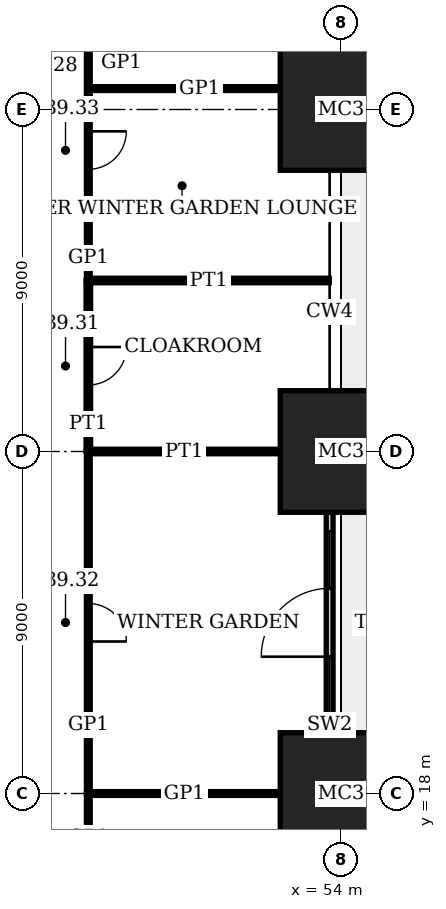
"""IFC4 building model, lengths in metres.
Left out: names, types, materials, properties, quantities, classifications, styles, units other than length and angle.
Written with IfcOpenShell. Run it as: python <this file> out.ifc"""

import sys

from ifc_helpers import new_model, si_unit, direction, frame, frame_2d, origin, origin_2d, place, context, subcontext, project, spatial, rectangle, extrude, element, fill, save


model = new_model("IFC4")
c1 = context("Model", 3, precision=1e-05, world=origin(), true_north=direction((0.0, 1.0)))
c2 = subcontext(c1, "Body", "Model", "MODEL_VIEW")
j1 = project(units=[si_unit("LENGTHUNIT", "METRE"), si_unit("PLANEANGLEUNIT", "RADIAN")], contexts=[c1])
p1 = place(None, origin())
s1 = spatial("IfcSite", under=j1, at=p1, CompositionType="ELEMENT")
p2 = place(p1, origin())
s2 = spatial("IfcBuilding", under=s1, at=p2, CompositionType="ELEMENT")
p3 = place(p2, frame((0.0, 0.0, 162.2)))
s3 = spatial("IfcBuildingStorey", under=s2, at=p3, CompositionType="ELEMENT", Elevation=162.2)
for number, where, z_axis, x_axis in (
    (1, (54.0, 18.0, 0.0), (0.0, 0.0, 1.0), (1.0, 0.0, 0.0)),
    (2, (54.0, 27.0, 0.0), (0.0, 0.0, 1.0), (1.0, 0.0, 0.0)),
    (3, (54.0, 36.0, 0.0), (0.0, 0.0, 1.0), (1.0, 0.0, 0.0)),
):
    element("IfcColumn", number, at=place(p3, frame(where, z_axis=z_axis, x_axis=x_axis)), inside=s3, PredefinedType="COLUMN", context=c2, shape_type="SweptSolid", body=[
        extrude(rectangle(XDim=3.2, YDim=3.2, at=origin_2d()), origin(), (0.0, 0.0, 1.0), 4.0),
    ])
p4 = place(p3, frame((53.7, 19.6, 0.0), z_axis=(0.0, 0.0, 1.0), x_axis=(0.0, 1.0, 0.0)))
e4 = element("IfcWall", 4, at=p4, inside=s3, PredefinedType="SOLIDWALL", context=c2, shape_type="SweptSolid", body=[
    extrude(rectangle(XDim=5.8, YDim=0.18, at=frame_2d((2.9, 0.0))), origin(), (0.0, 0.0, 1.0), 2.95),
])
p5 = place(p4, frame((2.0, 0.0, 0.0)))
e5 = element("IfcOpeningElement", 5, at=p5, cuts=e4, PredefinedType="OPENING", context=c2, shape_type="SweptSolid", body=[
    extrude(rectangle(XDim=1.8, YDim=2.7, at=frame_2d((0.9, 1.35))), frame((0.0, 0.1, 0.0), z_axis=(0.0, -1.0, 0.0), x_axis=(1.0, 0.0, 0.0)), (0.0, 0.0, 1.0), 0.2),
])
p6 = place(p4, frame((0.5, 0.0, 0.3)))
e6 = element("IfcOpeningElement", 6, at=p6, cuts=e4, PredefinedType="OPENING", context=c2, shape_type="SweptSolid", body=[
    extrude(rectangle(XDim=1.5, YDim=2.4, at=frame_2d((0.75, 1.2))), frame((0.0, 0.1, 0.0), z_axis=(0.0, -1.0, 0.0), x_axis=(1.0, 0.0, 0.0)), (0.0, 0.0, 1.0), 0.2),
])
p7 = place(p4, frame((3.8, 0.0, 0.3)))
e7 = element("IfcOpeningElement", 7, at=p7, cuts=e4, PredefinedType="OPENING", context=c2, shape_type="SweptSolid", body=[
    extrude(rectangle(XDim=1.5, YDim=2.4, at=frame_2d((0.75, 1.2))), frame((0.0, 0.1, 0.0), z_axis=(0.0, -1.0, 0.0), x_axis=(1.0, 0.0, 0.0)), (0.0, 0.0, 1.0), 0.2),
])
p8 = place(p3, frame((47.35, 18.0, 0.0), z_axis=(0.0, 0.0, 1.0), x_axis=(1.0, 0.0, 0.0)))
e8 = element("IfcWall", 8, at=p8, inside=s3, PredefinedType="PARTITIONING", context=c2, shape_type="SweptSolid", body=[
    extrude(rectangle(XDim=5.05, YDim=0.1, at=frame_2d((2.525, 0.0))), origin(), (0.0, 0.0, 1.0), 3.05),
])
p9 = place(p3, frame((47.35, 27.0, 0.0), z_axis=(0.0, 0.0, 1.0), x_axis=(1.0, 0.0, 0.0)))
e9 = element("IfcWall", 9, at=p9, inside=s3, PredefinedType="PARTITIONING", context=c2, shape_type="SweptSolid", body=[
    extrude(rectangle(XDim=5.05, YDim=0.12, at=frame_2d((2.525, 0.0))), origin(), (0.0, 0.0, 1.0), 3.05),
])
p10 = place(p3, frame((47.35, 31.5, 0.0), z_axis=(0.0, 0.0, 1.0), x_axis=(1.0, 0.0, 0.0)))
e10 = element("IfcWall", 10, at=p10, inside=s3, PredefinedType="PARTITIONING", context=c2, shape_type="SweptSolid", body=[
    extrude(rectangle(XDim=6.34, YDim=0.12, at=frame_2d((3.17, 0.0))), origin(), (0.0, 0.0, 1.0), 3.1),
])
p11 = place(p3, frame((47.35, 36.55, 0.0), z_axis=(0.0, 0.0, 1.0), x_axis=(1.0, 0.0, 0.0)))
e11 = element("IfcWall", 11, at=p11, inside=s3, PredefinedType="PARTITIONING", context=c2, shape_type="SweptSolid", body=[
    extrude(rectangle(XDim=5.05, YDim=0.1, at=frame_2d((2.525, 0.0))), origin(), (0.0, 0.0, 1.0), 3.05),
])
p12 = place(p3, frame((47.35, 27.0, 0.0), z_axis=(0.0, 0.0, 1.0), x_axis=(0.0, 1.0, 0.0)))
e12 = element("IfcWall", 12, at=p12, inside=s3, PredefinedType="PARTITIONING", context=c2, shape_type="SweptSolid", body=[
    extrude(rectangle(XDim=4.5, YDim=0.12, at=frame_2d((2.25, 0.0))), origin(), (0.0, 0.0, 1.0), 3.75),
])
p13 = place(p12, frame((1.75, 0.0, 0.0)))
e13 = element("IfcOpeningElement", 13, at=p13, cuts=e12, PredefinedType="OPENING", context=c2, shape_type="SweptSolid", body=[
    extrude(rectangle(XDim=1.0, YDim=2.4, at=frame_2d((0.5, 1.2))), frame((0.0, 0.07, 0.0), z_axis=(0.0, -1.0, 0.0), x_axis=(1.0, 0.0, 0.0)), (0.0, 0.0, 1.0), 0.14),
])
p14 = place(p3, frame((47.35, 15.65, 0.0), z_axis=(0.0, 0.0, 1.0), x_axis=(0.0, 1.0, 0.0)))
e14 = element("IfcWall", 14, at=p14, inside=s3, PredefinedType="PARTITIONING", context=c2, shape_type="SweptSolid", body=[
    extrude(rectangle(XDim=2.35, YDim=0.1, at=frame_2d((1.175, 0.0))), origin(), (0.0, 0.0, 1.0), 3.75),
])
p15 = place(p3, frame((47.35, 18.0, 0.0), z_axis=(0.0, 0.0, 1.0), x_axis=(0.0, 1.0, 0.0)))
e15 = element("IfcWall", 15, at=p15, inside=s3, PredefinedType="PARTITIONING", context=c2, shape_type="SweptSolid", body=[
    extrude(rectangle(XDim=9.0, YDim=0.1, at=frame_2d((4.5, 0.0))), origin(), (0.0, 0.0, 1.0), 3.75),
])
p16 = place(p15, frame((4.0, 0.0, 0.0)))
e16 = element("IfcOpeningElement", 16, at=p16, cuts=e15, PredefinedType="OPENING", context=c2, shape_type="SweptSolid", body=[
    extrude(rectangle(XDim=1.0, YDim=2.4, at=frame_2d((0.5, 1.2))), frame((0.0, 0.06, 0.0), z_axis=(0.0, -1.0, 0.0), x_axis=(1.0, 0.0, 0.0)), (0.0, 0.0, 1.0), 0.12),
])
p17 = place(p3, frame((47.35, 31.5, 0.0), z_axis=(0.0, 0.0, 1.0), x_axis=(0.0, 1.0, 0.0)))
e17 = element("IfcWall", 17, at=p17, inside=s3, PredefinedType="PARTITIONING", context=c2, shape_type="SweptSolid", body=[
    extrude(rectangle(XDim=6.85, YDim=0.1, at=frame_2d((3.425, 0.0))), origin(), (0.0, 0.0, 1.0), 3.75),
])
p18 = place(p17, frame((2.925, 0.0, 0.0)))
e18 = element("IfcOpeningElement", 18, at=p18, cuts=e17, PredefinedType="OPENING", context=c2, shape_type="SweptSolid", body=[
    extrude(rectangle(XDim=1.0, YDim=2.4, at=frame_2d((0.5, 1.2))), frame((0.0, 0.06, 0.0), z_axis=(0.0, -1.0, 0.0), x_axis=(1.0, 0.0, 0.0)), (0.0, 0.0, 1.0), 0.12),
])
p19 = place(p5, origin())
e19 = element("IfcDoor", 19, at=p19, inside=s3, OperationType="DOUBLE_DOOR_SINGLE_SWING", PredefinedType="DOOR", context=c2, shape_type="SweptSolid", body=[
    extrude(rectangle(XDim=1.8, YDim=2.7, at=frame_2d((0.9, 1.35))), frame((0.0, 0.035, 0.0), z_axis=(0.0, -1.0, 0.0), x_axis=(1.0, 0.0, 0.0)), (0.0, 0.0, 1.0), 0.07),
])
fill(e5, e19)
p20 = place(p6, origin())
e20 = element("IfcWindow", 20, at=p20, inside=s3, PartitioningType="SINGLE_PANEL", PredefinedType="WINDOW", context=c2, shape_type="SweptSolid", body=[
    extrude(rectangle(XDim=1.5, YDim=2.4, at=frame_2d((0.75, 1.2))), frame((0.0, 0.03, 0.0), z_axis=(0.0, -1.0, 0.0), x_axis=(1.0, 0.0, 0.0)), (0.0, 0.0, 1.0), 0.06),
])
fill(e6, e20)
p21 = place(p7, origin())
e21 = element("IfcWindow", 21, at=p21, inside=s3, PartitioningType="SINGLE_PANEL", PredefinedType="WINDOW", context=c2, shape_type="SweptSolid", body=[
    extrude(rectangle(XDim=1.5, YDim=2.4, at=frame_2d((0.75, 1.2))), frame((0.0, 0.03, 0.0), z_axis=(0.0, -1.0, 0.0), x_axis=(1.0, 0.0, 0.0)), (0.0, 0.0, 1.0), 0.06),
])
fill(e7, e21)
p22 = place(p13, origin())
e22 = element("IfcDoor", 22, at=p22, inside=s3, OperationType="SINGLE_SWING_RIGHT", PredefinedType="DOOR", context=c2, shape_type="SweptSolid", body=[
    extrude(rectangle(XDim=1.0, YDim=2.4, at=frame_2d((0.5, 1.2))), frame((0.0, 0.025, 0.0), z_axis=(0.0, -1.0, 0.0), x_axis=(1.0, 0.0, 0.0)), (0.0, 0.0, 1.0), 0.05),
])
fill(e13, e22)
p23 = place(p16, origin())
e23 = element("IfcDoor", 23, at=p23, inside=s3, OperationType="SINGLE_SWING_LEFT", PredefinedType="DOOR", context=c2, shape_type="SweptSolid", body=[
    extrude(rectangle(XDim=1.0, YDim=2.4, at=frame_2d((0.5, 1.2))), frame((0.0, 0.02, 0.0), z_axis=(0.0, -1.0, 0.0), x_axis=(1.0, 0.0, 0.0)), (0.0, 0.0, 1.0), 0.04),
])
fill(e16, e23)
p24 = place(p18, origin())
e24 = element("IfcDoor", 24, at=p24, inside=s3, OperationType="SINGLE_SWING_RIGHT", PredefinedType="DOOR", context=c2, shape_type="SweptSolid", body=[
    extrude(rectangle(XDim=1.0, YDim=2.4, at=frame_2d((0.5, 1.2))), frame((0.0, 0.02, 0.0), z_axis=(0.0, -1.0, 0.0), x_axis=(1.0, 0.0, 0.0)), (0.0, 0.0, 1.0), 0.04),
])
fill(e18, e24)
save(model, sys.argv[1])
